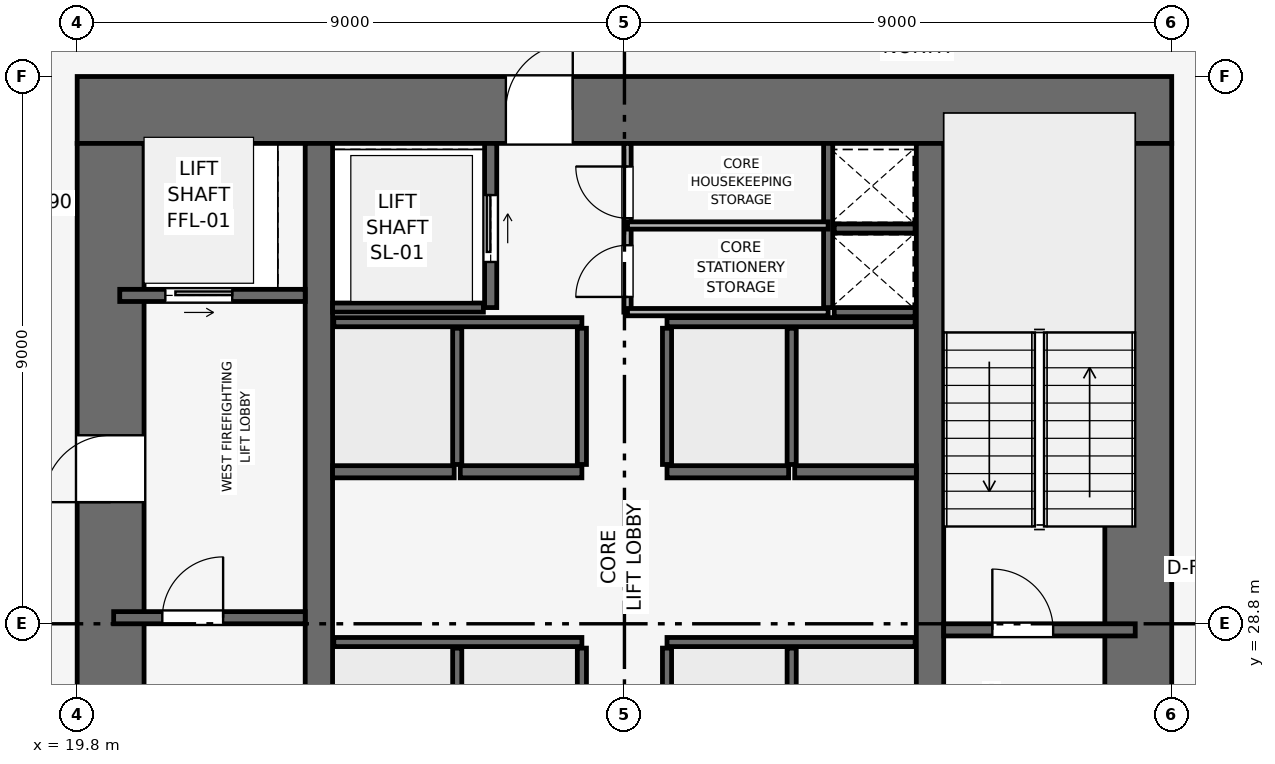
"""IFC4 building model, lengths in metres.
Left out: names, types, materials, properties, quantities, classifications, styles, units other than length and angle.
Written with IfcOpenShell. Run it as: python <this file> out.ifc"""

import sys

from ifc_helpers import new_model, si_unit, direction, frame, frame_2d, origin, place, context, subcontext, project, spatial, rectangle, extrude, element, fill, save


model = new_model("IFC4")
c1 = context("Model", 3, precision=1e-05, world=origin(), true_north=direction((0.0, 1.0)))
c2 = subcontext(c1, "Body", "Model", "MODEL_VIEW")
j1 = project(units=[si_unit("LENGTHUNIT", "METRE"), si_unit("PLANEANGLEUNIT", "RADIAN")], contexts=[c1])
p1 = place(None, origin())
s1 = spatial("IfcSite", under=j1, at=p1, CompositionType="ELEMENT")
p2 = place(p1, origin())
s2 = spatial("IfcBuilding", under=s1, at=p2, CompositionType="ELEMENT")
p3 = place(p2, frame((0.0, 0.0, 45.6)))
s3 = spatial("IfcBuildingStorey", under=s2, at=p3, CompositionType="ELEMENT", Elevation=45.6)
p4 = place(p3, frame((19.8, 37.25, 0.0), z_axis=(0.0, 0.0, 1.0), x_axis=(1.0, 0.0, 0.0)))
e1 = element("IfcWall", 1, at=p4, inside=s3, PredefinedType="SHEAR", context=c2, shape_type="SweptSolid", body=[
    extrude(rectangle(XDim=18.0, YDim=1.1, at=frame_2d((9.0, 0.0))), origin(), (0.0, 0.0, 1.0), 3.9),
])
p5 = place(p4, frame((7.05, 0.0, 0.0)))
e2 = element("IfcOpeningElement", 2, at=p5, cuts=e1, PredefinedType="OPENING", context=c2, shape_type="SweptSolid", body=[
    extrude(rectangle(XDim=1.1, YDim=2.15, at=frame_2d((0.55, 1.075))), frame((0.0, 0.56, 0.0), z_axis=(0.0, -1.0, 0.0), x_axis=(1.0, 0.0, 0.0)), (0.0, 0.0, 1.0), 1.12),
])
p6 = place(p3, frame((20.35, 20.9, 0.0), z_axis=(0.0, 0.0, 1.0), x_axis=(0.0, 1.0, 0.0)))
e3 = element("IfcWall", 3, at=p6, inside=s3, PredefinedType="SHEAR", context=c2, shape_type="SweptSolid", body=[
    extrude(rectangle(XDim=15.8, YDim=1.1, at=frame_2d((7.9, 0.0))), origin(), (0.0, 0.0, 1.0), 3.9),
])
p7 = place(p6, frame((9.9, 0.0, 0.0)))
e4 = element("IfcOpeningElement", 4, at=p7, cuts=e3, PredefinedType="OPENING", context=c2, shape_type="SweptSolid", body=[
    extrude(rectangle(XDim=1.1, YDim=2.15, at=frame_2d((0.55, 1.075))), frame((0.0, 0.56, 0.0), z_axis=(0.0, -1.0, 0.0), x_axis=(1.0, 0.0, 0.0)), (0.0, 0.0, 1.0), 1.12),
])
p8 = place(p3, frame((37.25, 20.9, 0.0), z_axis=(0.0, 0.0, 1.0), x_axis=(0.0, 1.0, 0.0)))
e5 = element("IfcWall", 5, at=p8, inside=s3, PredefinedType="SHEAR", context=c2, shape_type="SweptSolid", body=[
    extrude(rectangle(XDim=15.8, YDim=1.1, at=frame_2d((7.9, 0.0))), origin(), (0.0, 0.0, 1.0), 3.9),
])
p9 = place(p8, frame((4.4, 0.0, 0.0)))
e6 = element("IfcOpeningElement", 6, at=p9, cuts=e5, PredefinedType="OPENING", context=c2, shape_type="SweptSolid", body=[
    extrude(rectangle(XDim=1.1, YDim=2.15, at=frame_2d((0.55, 1.075))), frame((0.0, 0.56, 0.0), z_axis=(0.0, -1.0, 0.0), x_axis=(1.0, 0.0, 0.0)), (0.0, 0.0, 1.0), 1.12),
])
for number, where, z_axis, x_axis in (
    (7, (23.775, 20.9, 0.0), (0.0, 0.0, 1.0), (0.0, 1.0, 0.0)),
    (8, (33.825, 20.9, 0.0), (0.0, 0.0, 1.0), (0.0, 1.0, 0.0)),
):
    element("IfcWall", number, at=place(p3, frame(where, z_axis=z_axis, x_axis=x_axis)), inside=s3, PredefinedType="SHEAR", context=c2, shape_type="SweptSolid", body=[
        extrude(rectangle(XDim=15.8, YDim=0.45, at=frame_2d((7.9, 0.0))), origin(), (0.0, 0.0, 1.0), 3.9),
    ])
p10 = place(p3, frame((20.4, 28.9, 0.0), z_axis=(0.0, 0.0, 1.0), x_axis=(1.0, 0.0, 0.0)))
e9 = element("IfcWall", 9, at=p10, inside=s3, PredefinedType="SHEAR", context=c2, shape_type="SweptSolid", body=[
    extrude(rectangle(XDim=3.15, YDim=0.2, at=frame_2d((1.575, 0.0))), origin(), (0.0, 0.0, 1.0), 3.65),
])
p11 = place(p10, frame((0.8, 0.0, 0.0)))
e10 = element("IfcOpeningElement", 10, at=p11, cuts=e9, PredefinedType="OPENING", context=c2, shape_type="SweptSolid", body=[
    extrude(rectangle(XDim=1.0, YDim=2.1, at=frame_2d((0.5, 1.05))), frame((0.0, 0.11, 0.0), z_axis=(0.0, -1.0, 0.0), x_axis=(1.0, 0.0, 0.0)), (0.0, 0.0, 1.0), 0.22),
])
p12 = place(p3, frame((34.05, 28.7, 0.0), z_axis=(0.0, 0.0, 1.0), x_axis=(1.0, 0.0, 0.0)))
e11 = element("IfcWall", 11, at=p12, inside=s3, PredefinedType="SHEAR", context=c2, shape_type="SweptSolid", body=[
    extrude(rectangle(XDim=3.15, YDim=0.2, at=frame_2d((1.575, 0.0))), origin(), (0.0, 0.0, 1.0), 3.65),
])
p13 = place(p12, frame((0.8, 0.0, 0.0)))
e12 = element("IfcOpeningElement", 12, at=p13, cuts=e11, PredefinedType="OPENING", context=c2, shape_type="SweptSolid", body=[
    extrude(rectangle(XDim=1.0, YDim=2.1, at=frame_2d((0.5, 1.05))), frame((0.0, 0.11, 0.0), z_axis=(0.0, -1.0, 0.0), x_axis=(1.0, 0.0, 0.0)), (0.0, 0.0, 1.0), 0.22),
])
p14 = place(p3, frame((32.15, 34.0, 0.0), z_axis=(0.0, 0.0, 1.0), x_axis=(0.0, 1.0, 0.0)))
e13 = element("IfcWall", 13, at=p14, inside=s3, PredefinedType="SHEAR", context=c2, shape_type="SweptSolid", body=[
    extrude(rectangle(XDim=2.7, YDim=0.15, at=frame_2d((1.35, 0.0))), origin(), (0.0, 0.0, 1.0), 3.65),
])
for number, where, z_axis, x_axis in (
    (14, (32.25, 33.925, 0.0), (0.0, 0.0, 1.0), (1.0, 0.0, 0.0)),
    (15, (32.25, 35.3, 0.0), (0.0, 0.0, 1.0), (1.0, 0.0, 0.0)),
):
    element("IfcWall", number, at=place(p3, frame(where, z_axis=z_axis, x_axis=x_axis)), inside=s3, PredefinedType="SHEAR", context=c2, shape_type="SweptSolid", body=[
        extrude(rectangle(XDim=1.33, YDim=0.15, at=frame_2d((0.665, 0.0))), origin(), (0.0, 0.0, 1.0), 3.65),
    ])
p15 = place(p3, frame((20.5, 34.2, 0.0), z_axis=(0.0, 0.0, 1.0), x_axis=(1.0, 0.0, 0.0)))
e16 = element("IfcWall", 16, at=p15, inside=s3, PredefinedType="SHEAR", context=c2, shape_type="SweptSolid", body=[
    extrude(rectangle(XDim=3.05, YDim=0.2, at=frame_2d((1.525, 0.0))), origin(), (0.0, 0.0, 1.0), 3.65),
])
p16 = place(p15, frame((0.75, 0.0, 0.0)))
e17 = element("IfcOpeningElement", 17, at=p16, cuts=e16, PredefinedType="OPENING", context=c2, shape_type="SweptSolid", body=[
    extrude(rectangle(XDim=1.1, YDim=2.15, at=frame_2d((0.55, 1.075))), frame((0.0, 0.11, 0.0), z_axis=(0.0, -1.0, 0.0), x_axis=(1.0, 0.0, 0.0)), (0.0, 0.0, 1.0), 0.22),
])
p17 = place(p3, frame((26.6, 34.0, 0.0), z_axis=(0.0, 0.0, 1.0), x_axis=(0.0, 1.0, 0.0)))
e18 = element("IfcWall", 18, at=p17, inside=s3, PredefinedType="SHEAR", context=c2, shape_type="SweptSolid", body=[
    extrude(rectangle(XDim=2.7, YDim=0.2, at=frame_2d((1.35, 0.0))), origin(), (0.0, 0.0, 1.0), 3.65),
])
p18 = place(p17, frame((0.75, 0.0, 0.0)))
e19 = element("IfcOpeningElement", 19, at=p18, cuts=e18, PredefinedType="OPENING", context=c2, shape_type="SweptSolid", body=[
    extrude(rectangle(XDim=1.1, YDim=2.15, at=frame_2d((0.55, 1.075))), frame((0.0, 0.11, 0.0), z_axis=(0.0, -1.0, 0.0), x_axis=(1.0, 0.0, 0.0)), (0.0, 0.0, 1.0), 0.22),
])
p19 = place(p3, frame((24.0, 34.0, 0.0), z_axis=(0.0, 0.0, 1.0), x_axis=(1.0, 0.0, 0.0)))
e20 = element("IfcWall", 20, at=p19, inside=s3, PredefinedType="SHEAR", context=c2, shape_type="SweptSolid", body=[
    extrude(rectangle(XDim=2.48, YDim=0.15, at=frame_2d((1.24, 0.0))), origin(), (0.0, 0.0, 1.0), 3.65),
])
for number, where, z_axis, x_axis in (
    (21, (24.0, 31.3, 0.0), (0.0, 0.0, 1.0), (1.0, 0.0, 0.0)),
    (22, (26.1, 31.3, 0.0), (0.0, 0.0, 1.0), (1.0, 0.0, 0.0)),
    (23, (29.5, 31.3, 0.0), (0.0, 0.0, 1.0), (1.0, 0.0, 0.0)),
    (24, (31.6, 31.3, 0.0), (0.0, 0.0, 1.0), (1.0, 0.0, 0.0)),
):
    element("IfcWall", number, at=place(p3, frame(where, z_axis=z_axis, x_axis=x_axis)), inside=s3, PredefinedType="SHEAR", context=c2, shape_type="SweptSolid", body=[
        extrude(rectangle(XDim=2.0, YDim=0.2, at=frame_2d((1.0, 0.0))), origin(), (0.0, 0.0, 1.0), 3.65),
    ])
for number, where, z_axis, x_axis in (
    (25, (24.02, 28.5, 0.0), (0.0, 0.0, 1.0), (1.0, 0.0, 0.0)),
    (26, (29.5, 28.5, 0.0), (0.0, 0.0, 1.0), (1.0, 0.0, 0.0)),
):
    element("IfcWall", number, at=place(p3, frame(where, z_axis=z_axis, x_axis=x_axis)), inside=s3, PredefinedType="SHEAR", context=c2, shape_type="SweptSolid", body=[
        extrude(rectangle(XDim=4.08, YDim=0.15, at=frame_2d((2.04, 0.0))), origin(), (0.0, 0.0, 1.0), 3.65),
    ])
for number, where, z_axis, x_axis in (
    (27, (26.05, 26.12, 0.0), (0.0, 0.0, 1.0), (0.0, 1.0, 0.0)),
    (28, (28.1, 26.12, 0.0), (0.0, 0.0, 1.0), (0.0, 1.0, 0.0)),
    (29, (29.5, 26.12, 0.0), (0.0, 0.0, 1.0), (0.0, 1.0, 0.0)),
    (30, (31.55, 26.12, 0.0), (0.0, 0.0, 1.0), (0.0, 1.0, 0.0)),
):
    element("IfcWall", number, at=place(p3, frame(where, z_axis=z_axis, x_axis=x_axis)), inside=s3, PredefinedType="SHEAR", context=c2, shape_type="SweptSolid", body=[
        extrude(rectangle(XDim=2.28, YDim=0.15, at=frame_2d((1.14, 0.0))), origin(), (0.0, 0.0, 1.0), 3.65),
    ])
for number, where, z_axis, x_axis in (
    (31, (24.02, 33.76, 0.0), (0.0, 0.0, 1.0), (1.0, 0.0, 0.0)),
    (32, (29.5, 33.76, 0.0), (0.0, 0.0, 1.0), (1.0, 0.0, 0.0)),
):
    element("IfcWall", number, at=place(p3, frame(where, z_axis=z_axis, x_axis=x_axis)), inside=s3, PredefinedType="SHEAR", context=c2, shape_type="SweptSolid", body=[
        extrude(rectangle(XDim=4.08, YDim=0.15, at=frame_2d((2.04, 0.0))), origin(), (0.0, 0.0, 1.0), 3.65),
    ])
for number, where, z_axis, x_axis in (
    (33, (26.05, 31.42, 0.0), (0.0, 0.0, 1.0), (0.0, 1.0, 0.0)),
    (34, (28.1, 31.42, 0.0), (0.0, 0.0, 1.0), (0.0, 1.0, 0.0)),
    (35, (29.5, 31.42, 0.0), (0.0, 0.0, 1.0), (0.0, 1.0, 0.0)),
    (36, (31.55, 31.42, 0.0), (0.0, 0.0, 1.0), (0.0, 1.0, 0.0)),
):
    element("IfcWall", number, at=place(p3, frame(where, z_axis=z_axis, x_axis=x_axis)), inside=s3, PredefinedType="SHEAR", context=c2, shape_type="SweptSolid", body=[
        extrude(rectangle(XDim=2.24, YDim=0.15, at=frame_2d((1.12, 0.0))), origin(), (0.0, 0.0, 1.0), 3.65),
    ])
p20 = place(p3, frame((28.85, 33.925, 0.0), z_axis=(0.0, 0.0, 1.0), x_axis=(0.0, 1.0, 0.0)))
e37 = element("IfcWall", 37, at=p20, inside=s3, PredefinedType="PARTITIONING", context=c2, shape_type="SweptSolid", body=[
    extrude(rectangle(XDim=2.775, YDim=0.12, at=frame_2d((1.387, 0.0))), origin(), (0.0, 0.0, 1.0), 3.65),
])
p21 = place(p20, frame((0.25, 0.0, 0.0)))
e38 = element("IfcOpeningElement", 38, at=p21, cuts=e37, PredefinedType="OPENING", context=c2, shape_type="SweptSolid", body=[
    extrude(rectangle(XDim=0.85, YDim=2.1, at=frame_2d((0.425, 1.05))), frame((0.0, 0.07, 0.0), z_axis=(0.0, -1.0, 0.0), x_axis=(1.0, 0.0, 0.0)), (0.0, 0.0, 1.0), 0.14),
])
p22 = place(p20, frame((1.545, 0.0, 0.0)))
e39 = element("IfcOpeningElement", 39, at=p22, cuts=e37, PredefinedType="OPENING", context=c2, shape_type="SweptSolid", body=[
    extrude(rectangle(XDim=0.85, YDim=2.1, at=frame_2d((0.425, 1.05))), frame((0.0, 0.07, 0.0), z_axis=(0.0, -1.0, 0.0), x_axis=(1.0, 0.0, 0.0)), (0.0, 0.0, 1.0), 0.14),
])
for number, where, z_axis, x_axis in (
    (40, (28.85, 35.35, 0.0), (0.0, 0.0, 1.0), (1.0, 0.0, 0.0)),
    (41, (28.85, 33.925, 0.0), (0.0, 0.0, 1.0), (1.0, 0.0, 0.0)),
):
    element("IfcWall", number, at=place(p3, frame(where, z_axis=z_axis, x_axis=x_axis)), inside=s3, PredefinedType="PARTITIONING", context=c2, shape_type="SweptSolid", body=[
        extrude(rectangle(XDim=3.3, YDim=0.12, at=frame_2d((1.65, 0.0))), origin(), (0.0, 0.0, 1.0), 3.65),
    ])
p23 = place(p11, origin())
e42 = element("IfcDoor", 42, at=p23, inside=s3, OperationType="SINGLE_SWING_RIGHT", PredefinedType="DOOR", context=c2, shape_type="SweptSolid", body=[
    extrude(rectangle(XDim=1.0, YDim=2.1, at=frame_2d((0.5, 1.05))), frame((0.0, 0.025, 0.0), z_axis=(0.0, -1.0, 0.0), x_axis=(1.0, 0.0, 0.0)), (0.0, 0.0, 1.0), 0.05),
])
fill(e10, e42)
p24 = place(p13, origin())
e43 = element("IfcDoor", 43, at=p24, inside=s3, OperationType="SINGLE_SWING_LEFT", PredefinedType="DOOR", context=c2, shape_type="SweptSolid", body=[
    extrude(rectangle(XDim=1.0, YDim=2.1, at=frame_2d((0.5, 1.05))), frame((0.0, 0.025, 0.0), z_axis=(0.0, -1.0, 0.0), x_axis=(1.0, 0.0, 0.0)), (0.0, 0.0, 1.0), 0.05),
])
fill(e12, e43)
p25 = place(p16, origin())
e44 = element("IfcDoor", 44, at=p25, inside=s3, OperationType="SLIDING_TO_RIGHT", PredefinedType="DOOR", context=c2, shape_type="SweptSolid", body=[
    extrude(rectangle(XDim=1.1, YDim=2.15, at=frame_2d((0.55, 1.075))), frame((0.0, 0.025, 0.0), z_axis=(0.0, -1.0, 0.0), x_axis=(1.0, 0.0, 0.0)), (0.0, 0.0, 1.0), 0.05),
])
fill(e17, e44)
p26 = place(p18, origin())
e45 = element("IfcDoor", 45, at=p26, inside=s3, OperationType="SLIDING_TO_RIGHT", PredefinedType="DOOR", context=c2, shape_type="SweptSolid", body=[
    extrude(rectangle(XDim=1.1, YDim=2.15, at=frame_2d((0.55, 1.075))), frame((0.0, 0.025, 0.0), z_axis=(0.0, -1.0, 0.0), x_axis=(1.0, 0.0, 0.0)), (0.0, 0.0, 1.0), 0.05),
])
fill(e19, e45)
p27 = place(p21, origin())
e46 = element("IfcDoor", 46, at=p27, inside=s3, OperationType="SINGLE_SWING_LEFT", PredefinedType="DOOR", context=c2, shape_type="SweptSolid", body=[
    extrude(rectangle(XDim=0.85, YDim=2.1, at=frame_2d((0.425, 1.05))), frame((0.0, 0.025, 0.0), z_axis=(0.0, -1.0, 0.0), x_axis=(1.0, 0.0, 0.0)), (0.0, 0.0, 1.0), 0.05),
])
fill(e38, e46)
p28 = place(p22, origin())
e47 = element("IfcDoor", 47, at=p28, inside=s3, OperationType="SINGLE_SWING_RIGHT", PredefinedType="DOOR", context=c2, shape_type="SweptSolid", body=[
    extrude(rectangle(XDim=0.85, YDim=2.1, at=frame_2d((0.425, 1.05))), frame((0.0, 0.025, 0.0), z_axis=(0.0, -1.0, 0.0), x_axis=(1.0, 0.0, 0.0)), (0.0, 0.0, 1.0), 0.05),
])
fill(e39, e47)
p29 = place(p7, origin())
e48 = element("IfcDoor", 48, at=p29, inside=s3, OperationType="SINGLE_SWING_LEFT", PredefinedType="DOOR", context=c2, shape_type="SweptSolid", body=[
    extrude(rectangle(XDim=1.1, YDim=2.15, at=frame_2d((0.55, 1.075))), frame((0.0, 0.025, 0.0), z_axis=(0.0, -1.0, 0.0), x_axis=(1.0, 0.0, 0.0)), (0.0, 0.0, 1.0), 0.05),
])
fill(e4, e48)
p30 = place(p5, origin())
e49 = element("IfcDoor", 49, at=p30, inside=s3, OperationType="SINGLE_SWING_RIGHT", PredefinedType="DOOR", context=c2, shape_type="SweptSolid", body=[
    extrude(rectangle(XDim=1.1, YDim=2.15, at=frame_2d((0.55, 1.075))), frame((0.0, 0.025, 0.0), z_axis=(0.0, -1.0, 0.0), x_axis=(1.0, 0.0, 0.0)), (0.0, 0.0, 1.0), 0.05),
])
fill(e2, e49)
save(model, sys.argv[1])
